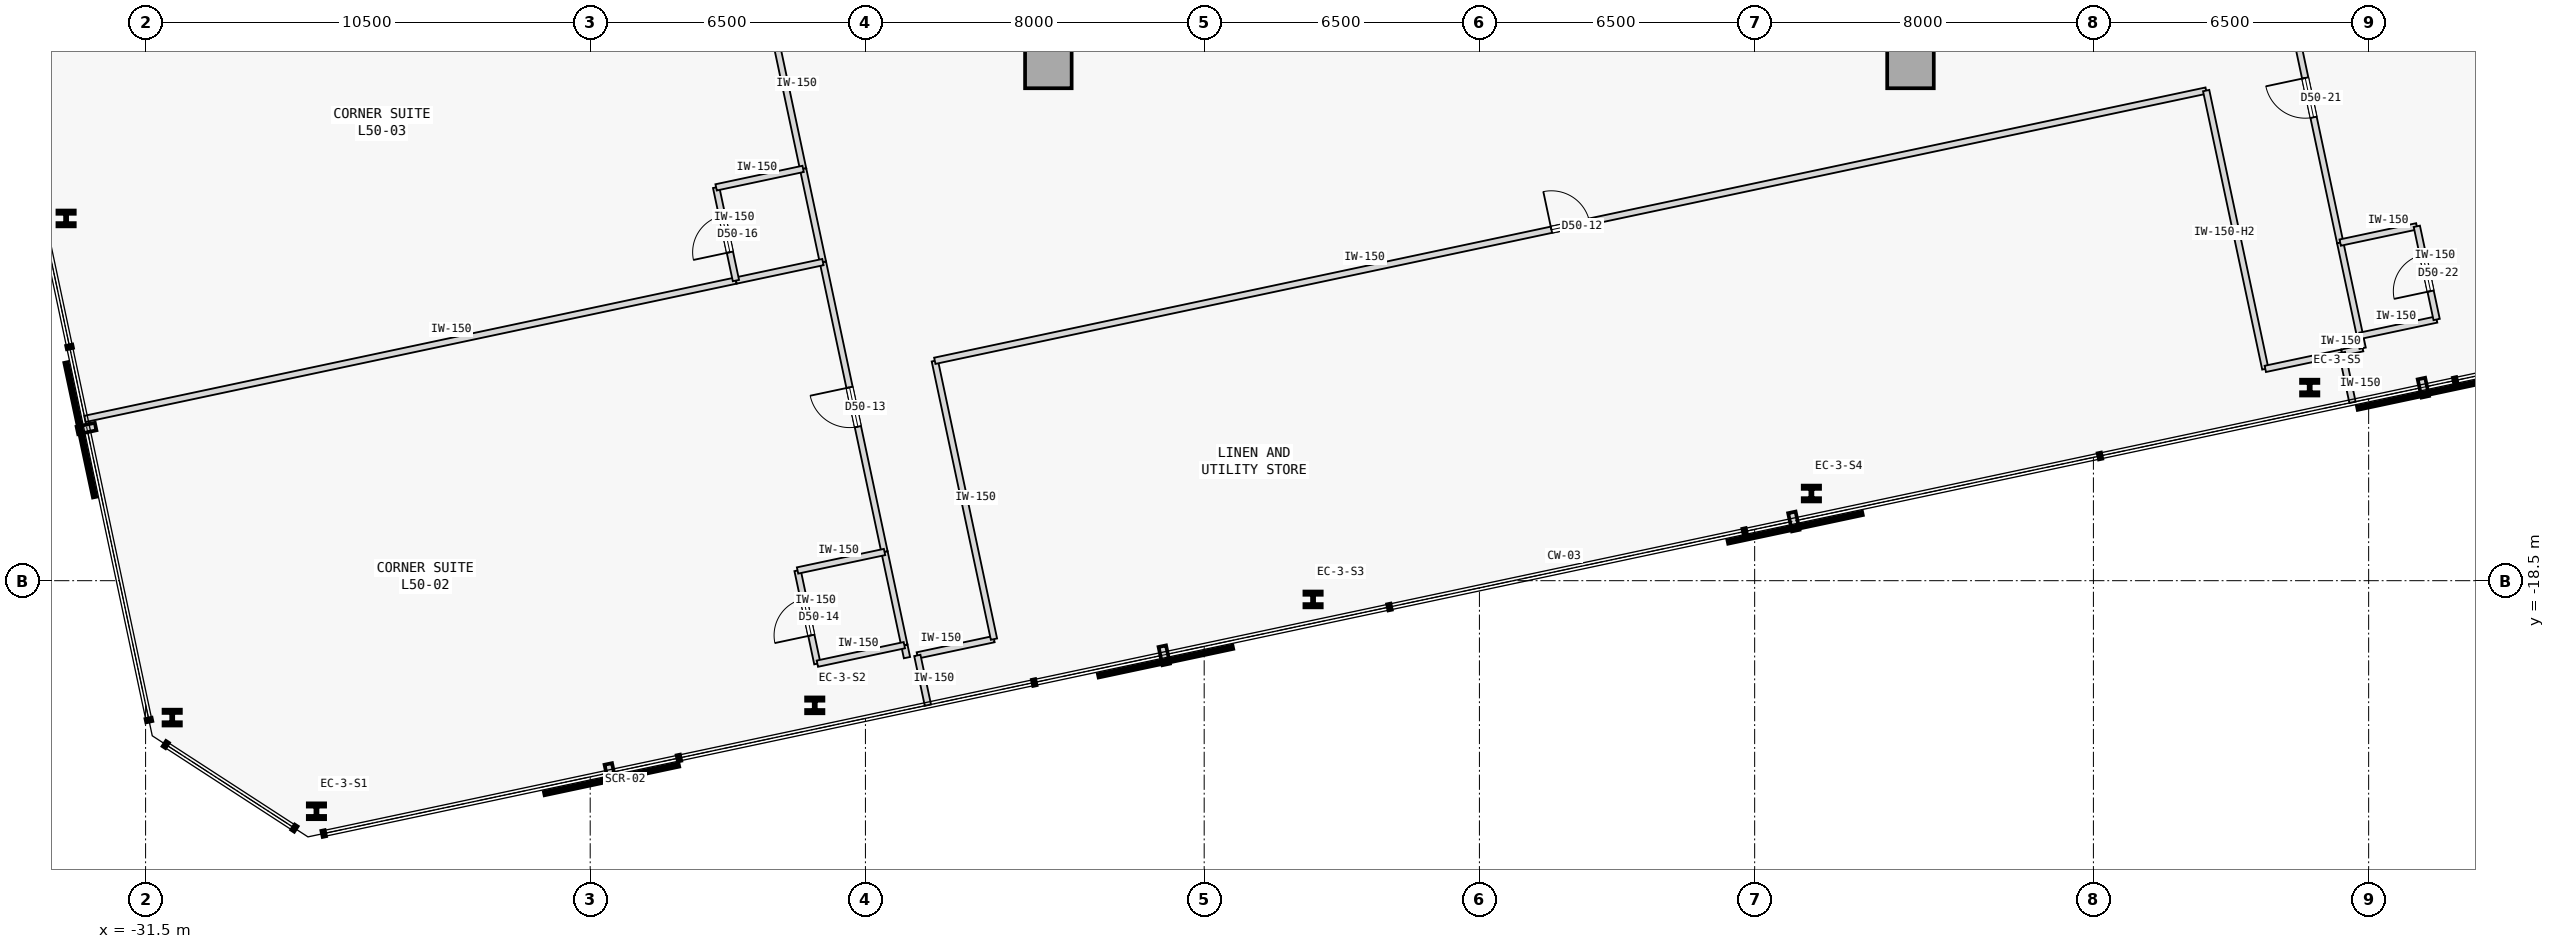
"""IFC4 building model, lengths in metres.
Left out: names, types, materials, properties, quantities, classifications, styles, units other than length and angle.
Written with IfcOpenShell. Run it as: python <this file> out.ifc"""

import sys

from ifc_helpers import new_model, si_unit, direction, frame, frame_2d, origin, origin_2d, place, context, subcontext, project, spatial, rectangle, i_section, extrude, element, fill, save


model = new_model("IFC4")
c1 = context("Model", 3, precision=1e-05, world=origin(), true_north=direction((0.0, 1.0)))
c2 = subcontext(c1, "Body", "Model", "MODEL_VIEW")
j1 = project(units=[si_unit("LENGTHUNIT", "METRE"), si_unit("PLANEANGLEUNIT", "RADIAN")], contexts=[c1])
p1 = place(None, origin())
s1 = spatial("IfcSite", under=j1, at=p1, CompositionType="ELEMENT")
p2 = place(p1, origin())
s2 = spatial("IfcBuilding", under=s1, at=p2, CompositionType="ELEMENT")
p3 = place(p2, frame((0.0, 0.0, 192.2)))
s3 = spatial("IfcBuildingStorey", under=s2, at=p3, CompositionType="ELEMENT", Elevation=192.2)
for number, where, z_axis, x_axis in (
    (1, (-10.18, -6.32, 0.0), (0.0, 0.0, 1.0), (1.0, 0.0, 0.0)),
    (2, (10.18, -6.32, 0.0), (0.0, 0.0, 1.0), (1.0, 0.0, 0.0)),
):
    element("IfcColumn", number, at=place(p3, frame(where, z_axis=z_axis, x_axis=x_axis)), inside=s3, PredefinedType="COLUMN", context=c2, shape_type="SweptSolid", body=[
        extrude(rectangle(XDim=1.1, YDim=1.1, at=origin_2d()), origin(), (0.0, 0.0, 1.0), 3.4),
    ])
for number, where, z_axis, x_axis in (
    (3, (-27.465, -23.946, 0.0), (0.0, 0.0, 1.0), (1.0, 0.0, 0.0)),
    (4, (-15.697, -21.444, 0.0), (0.0, 0.0, 1.0), (1.0, 0.0, 0.0)),
    (5, (-3.928, -18.943, 0.0), (0.0, 0.0, 1.0), (1.0, 0.0, 0.0)),
    (6, (7.84, -16.441, 0.0), (0.0, 0.0, 1.0), (1.0, 0.0, 0.0)),
    (7, (19.608, -13.94, 0.0), (0.0, 0.0, 1.0), (1.0, 0.0, 0.0)),
    (8, (-33.377, -9.945, 0.0), (0.0, 0.0, 1.0), (1.0, 0.0, 0.0)),
    (9, (-30.871, -21.733, 0.0), (0.0, 0.0, 1.0), (1.0, 0.0, 0.0)),
):
    element("IfcColumn", number, at=place(p3, frame(where, z_axis=z_axis, x_axis=x_axis)), inside=s3, PredefinedType="COLUMN", context=c2, shape_type="SweptSolid", body=[
        extrude(i_section(OverallWidth=0.409, OverallDepth=0.374, WebThickness=0.048, FlangeThickness=0.077, FilletRadius=0.015, at=origin_2d()), origin(), (0.0, 0.0, 1.0), 3.4),
    ])
p4 = place(p3, frame((-13.274, -20.265, 0.0), z_axis=(0.0, 0.0, 1.0), x_axis=(0.978160192495, 0.207852442415, 0.0)))
e10 = element("IfcWall", 10, at=p4, inside=s3, PredefinedType="PARTITIONING", context=c2, shape_type="SweptSolid", body=[
    extrude(rectangle(XDim=1.85, YDim=0.15, at=frame_2d((0.925, 0.0))), origin(), (0.0, 0.0, 1.0), 3.175),
])
p5 = place(p3, frame((-11.465, -19.88, 0.0), z_axis=(0.0, 0.0, 1.0), x_axis=(-0.207916109912, 0.978146661416, 0.0)))
e11 = element("IfcWall", 11, at=p5, inside=s3, PredefinedType="PARTITIONING", context=c2, shape_type="SweptSolid", body=[
    extrude(rectangle(XDim=6.72, YDim=0.15, at=frame_2d((3.36, 0.0))), origin(), (0.0, 0.0, 1.0), 3.175),
])
p6 = place(p3, frame((-12.862, -13.307, 0.0), z_axis=(0.0, 0.0, 1.0), x_axis=(0.97814793387, 0.207910123527, 0.0)))
e12 = element("IfcWall", 12, at=p6, inside=s3, PredefinedType="PARTITIONING", context=c2, shape_type="SweptSolid", body=[
    extrude(rectangle(XDim=30.695, YDim=0.15, at=frame_2d((15.348, 0.0))), origin(), (0.0, 0.0, 1.0), 3.175),
])
p7 = place(p6, frame((14.887, 0.0, 0.0)))
e13 = element("IfcOpeningElement", 13, at=p7, cuts=e12, PredefinedType="OPENING", context=c2, shape_type="SweptSolid", body=[
    extrude(rectangle(XDim=0.92, YDim=2.15, at=frame_2d((0.46, 1.075))), frame((0.0, 0.085, 0.0), z_axis=(0.0, -1.0, 0.0), x_axis=(1.0, 0.0, 0.0)), (0.0, 0.0, 1.0), 0.17),
])
p8 = place(p3, frame((18.56, -13.498, 0.0), z_axis=(0.0, 0.0, 1.0), x_axis=(-0.207888737749, 0.978152479278, 0.0)))
e14 = element("IfcWall", 14, at=p8, inside=s3, PredefinedType="PARTITIONING", context=c2, shape_type="SweptSolid", body=[
    extrude(rectangle(XDim=6.72, YDim=0.15, at=frame_2d((3.36, 0.0))), origin(), (0.0, 0.0, 1.0), 2.575),
])
p9 = place(p3, frame((18.56, -13.498, 0.0), z_axis=(0.0, 0.0, 1.0), x_axis=(0.978160192495, 0.207852442415, 0.0)))
e15 = element("IfcWall", 15, at=p9, inside=s3, PredefinedType="PARTITIONING", context=c2, shape_type="SweptSolid", body=[
    extrude(rectangle(XDim=1.85, YDim=0.15, at=frame_2d((0.925, 0.0))), origin(), (0.0, 0.0, 1.0), 3.175),
])
p10 = place(p3, frame((-13.519, -20.317, 0.0), z_axis=(0.0, 0.0, 1.0), x_axis=(-0.207527808066, 0.978229118806, 0.0)))
e16 = element("IfcWall", 16, at=p10, inside=s3, PredefinedType="PARTITIONING", context=c2, shape_type="SweptSolid", body=[
    extrude(rectangle(XDim=0.3, YDim=0.15, at=frame_2d((0.15, 0.0))), origin(), (0.0, 0.0, 1.0), 3.175),
])
p11 = place(p3, frame((-14.049, -17.823, 0.0), z_axis=(0.0, 0.0, 1.0), x_axis=(-0.207940096132, 0.978141562567, 0.0)))
e17 = element("IfcWall", 17, at=p11, inside=s3, PredefinedType="PARTITIONING", context=c2, shape_type="SweptSolid", body=[
    extrude(rectangle(XDim=7.0, YDim=0.15, at=frame_2d((3.5, 0.0))), origin(), (0.0, 0.0, 1.0), 3.175),
])
p12 = place(p11, frame((3.025, 0.0, 0.0)))
e18 = element("IfcOpeningElement", 18, at=p12, cuts=e17, PredefinedType="OPENING", context=c2, shape_type="SweptSolid", body=[
    extrude(rectangle(XDim=0.95, YDim=2.15, at=frame_2d((0.475, 1.075))), frame((0.0, 0.085, 0.0), z_axis=(0.0, -1.0, 0.0), x_axis=(1.0, 0.0, 0.0)), (0.0, 0.0, 1.0), 0.17),
])
p13 = place(p3, frame((-13.581, -20.023, 0.0), z_axis=(0.0, 0.0, 1.0), x_axis=(-0.207891197838, 0.978151956427, 0.0)))
e19 = element("IfcWall", 19, at=p13, inside=s3, PredefinedType="PARTITIONING", context=c2, shape_type="SweptSolid", body=[
    extrude(rectangle(XDim=2.25, YDim=0.15, at=frame_2d((1.125, 0.0))), origin(), (0.0, 0.0, 1.0), 3.175),
])
p14 = place(p3, frame((-15.972, -8.775, 0.0), z_axis=(0.0, 0.0, 1.0), x_axis=(-0.207894825434, 0.97815118543, 0.0)))
e20 = element("IfcWall", 20, at=p14, inside=s3, PredefinedType="PARTITIONING", context=c2, shape_type="SweptSolid", body=[
    extrude(rectangle(XDim=8.5, YDim=0.15, at=frame_2d((4.25, 0.0))), origin(), (0.0, 0.0, 1.0), 3.175),
])
p15 = place(p14, frame((5.05, 0.0, 0.0)))
e21 = element("IfcOpeningElement", 21, at=p15, cuts=e20, PredefinedType="OPENING", context=c2, shape_type="SweptSolid", body=[
    extrude(rectangle(XDim=0.95, YDim=2.15, at=frame_2d((0.475, 1.075))), frame((0.0, 0.085, 0.0), z_axis=(0.0, -1.0, 0.0), x_axis=(1.0, 0.0, 0.0)), (0.0, 0.0, 1.0), 0.17),
])
p16 = place(p3, frame((-15.504, -10.976, 0.0), z_axis=(0.0, 0.0, 1.0), x_axis=(-0.207891197838, 0.978151956427, 0.0)))
e22 = element("IfcWall", 22, at=p16, inside=s3, PredefinedType="PARTITIONING", context=c2, shape_type="SweptSolid", body=[
    extrude(rectangle(XDim=2.25, YDim=0.15, at=frame_2d((1.125, 0.0))), origin(), (0.0, 0.0, 1.0), 3.175),
])
p17 = place(p3, frame((20.369, -13.114, 0.0), z_axis=(0.0, 0.0, 1.0), x_axis=(0.978143962546, 0.207928806409, 0.0)))
e23 = element("IfcWall", 23, at=p17, inside=s3, PredefinedType="PARTITIONING", context=c2, shape_type="SweptSolid", body=[
    extrude(rectangle(XDim=0.5, YDim=0.15, at=frame_2d((0.25, 0.0))), origin(), (0.0, 0.0, 1.0), 3.175),
])
p18 = place(p3, frame((20.858, -13.01, 0.0), z_axis=(0.0, 0.0, 1.0), x_axis=(-0.208306395052, 0.978063620518, 0.0)))
e24 = element("IfcWall", 24, at=p18, inside=s3, PredefinedType="PARTITIONING", context=c2, shape_type="SweptSolid", body=[
    extrude(rectangle(XDim=0.3, YDim=0.15, at=frame_2d((0.15, 0.0))), origin(), (0.0, 0.0, 1.0), 3.175),
])
p19 = place(p3, frame((20.328, -10.515, 0.0), z_axis=(0.0, 0.0, 1.0), x_axis=(-0.207906726269, 0.978148655968, 0.0)))
e25 = element("IfcWall", 25, at=p19, inside=s3, PredefinedType="PARTITIONING", context=c2, shape_type="SweptSolid", body=[
    extrude(rectangle(XDim=7.0, YDim=0.15, at=frame_2d((3.5, 0.0))), origin(), (0.0, 0.0, 1.0), 3.175),
])
p20 = place(p19, frame((3.025, 0.0, 0.0)))
e26 = element("IfcOpeningElement", 26, at=p20, cuts=e25, PredefinedType="OPENING", context=c2, shape_type="SweptSolid", body=[
    extrude(rectangle(XDim=0.95, YDim=2.15, at=frame_2d((0.475, 1.075))), frame((0.0, 0.085, 0.0), z_axis=(0.0, -1.0, 0.0), x_axis=(1.0, 0.0, 0.0)), (0.0, 0.0, 1.0), 0.17),
])
p21 = place(p3, frame((20.796, -12.716, 0.0), z_axis=(0.0, 0.0, 1.0), x_axis=(-0.207891197838, 0.978151956427, 0.0)))
e27 = element("IfcWall", 27, at=p21, inside=s3, PredefinedType="PARTITIONING", context=c2, shape_type="SweptSolid", body=[
    extrude(rectangle(XDim=2.25, YDim=0.15, at=frame_2d((1.125, 0.0))), origin(), (0.0, 0.0, 1.0), 3.175),
])
for number, where, z_axis, x_axis in (
    (28, (-13.025, -21.439, 0.0), (0.0, 0.0, 1.0), (-0.208, 0.978, 0.0)),
    (29, (20.619, -14.288, 0.0), (0.0, 0.0, 1.0), (-0.208, 0.978, 0.0)),
):
    element("IfcWall", number, at=place(p3, frame(where, z_axis=z_axis, x_axis=x_axis)), inside=s3, PredefinedType="PARTITIONING", context=c2, shape_type="SweptSolid", body=[
        extrude(rectangle(XDim=1.2, YDim=0.15, at=frame_2d((0.6, 0.0))), origin(), (0.0, 0.0, 1.0), 3.175),
    ])
p22 = place(p3, frame((-15.635, -20.46, 0.0), z_axis=(0.0, 0.0, 1.0), x_axis=(-0.207913264065, 0.978147266328, 0.0)))
e30 = element("IfcWall", 30, at=p22, inside=s3, PredefinedType="PARTITIONING", context=c2, shape_type="SweptSolid", body=[
    extrude(rectangle(XDim=2.25, YDim=0.15, at=frame_2d((1.125, 0.0))), origin(), (0.0, 0.0, 1.0), 3.175),
])
p23 = place(p22, frame((0.685, 0.0, 0.0)))
e31 = element("IfcOpeningElement", 31, at=p23, cuts=e30, PredefinedType="OPENING", context=c2, shape_type="SweptSolid", body=[
    extrude(rectangle(XDim=0.88, YDim=2.15, at=frame_2d((0.44, 1.075))), frame((0.0, 0.085, 0.0), z_axis=(0.0, -1.0, 0.0), x_axis=(1.0, 0.0, 0.0)), (0.0, 0.0, 1.0), 0.17),
])
for number, where, z_axis, x_axis in (
    (32, (-15.635, -20.46, 0.0), (0.0, 0.0, 1.0), (0.978, 0.208, 0.0)),
    (33, (-16.103, -18.259, 0.0), (0.0, 0.0, 1.0), (0.978, 0.208, 0.0)),
):
    element("IfcWall", number, at=place(p3, frame(where, z_axis=z_axis, x_axis=x_axis)), inside=s3, PredefinedType="PARTITIONING", context=c2, shape_type="SweptSolid", body=[
        extrude(rectangle(XDim=2.1, YDim=0.15, at=frame_2d((1.05, 0.0))), origin(), (0.0, 0.0, 1.0), 3.175),
    ])
p24 = place(p3, frame((-32.933, -14.68, 0.0), z_axis=(0.0, 0.0, 1.0), x_axis=(0.978146137903, 0.207918572776, 0.0)))
e34 = element("IfcWall", 34, at=p24, inside=s3, PredefinedType="PARTITIONING", context=c2, shape_type="SweptSolid", body=[
    extrude(rectangle(XDim=15.718, YDim=0.15, at=frame_2d((7.859, 0.0))), origin(), (0.0, 0.0, 1.0), 3.175),
])
p25 = place(p3, frame((-17.558, -11.412, 0.0), z_axis=(0.0, 0.0, 1.0), x_axis=(0.978153236239, 0.207885176084, 0.0)))
e35 = element("IfcWall", 35, at=p25, inside=s3, PredefinedType="PARTITIONING", context=c2, shape_type="SweptSolid", body=[
    extrude(rectangle(XDim=2.1, YDim=0.15, at=frame_2d((1.05, 0.0))), origin(), (0.0, 0.0, 1.0), 3.175),
])
p26 = place(p3, frame((-17.558, -11.412, 0.0), z_axis=(0.0, 0.0, 1.0), x_axis=(-0.207891197838, 0.978151956427, 0.0)))
e36 = element("IfcWall", 36, at=p26, inside=s3, PredefinedType="PARTITIONING", context=c2, shape_type="SweptSolid", body=[
    extrude(rectangle(XDim=2.25, YDim=0.15, at=frame_2d((1.125, 0.0))), origin(), (0.0, 0.0, 1.0), 3.175),
])
p27 = place(p26, frame((0.685, 0.0, 0.0)))
e37 = element("IfcOpeningElement", 37, at=p27, cuts=e36, PredefinedType="OPENING", context=c2, shape_type="SweptSolid", body=[
    extrude(rectangle(XDim=0.88, YDim=2.15, at=frame_2d((0.44, 1.075))), frame((0.0, 0.085, 0.0), z_axis=(0.0, -1.0, 0.0), x_axis=(1.0, 0.0, 0.0)), (0.0, 0.0, 1.0), 0.17),
])
p28 = place(p3, frame((-18.026, -9.211, 0.0), z_axis=(0.0, 0.0, 1.0), x_axis=(0.978153236239, 0.207885176084, 0.0)))
e38 = element("IfcWall", 38, at=p28, inside=s3, PredefinedType="PARTITIONING", context=c2, shape_type="SweptSolid", body=[
    extrude(rectangle(XDim=2.1, YDim=0.15, at=frame_2d((1.05, 0.0))), origin(), (0.0, 0.0, 1.0), 3.175),
])
for number, where, z_axis, x_axis in (
    (39, (20.796, -12.716, 0.0), (0.0, 0.0, 1.0), (0.978, 0.208, 0.0)),
    (40, (20.328, -10.515, 0.0), (0.0, 0.0, 1.0), (0.978, 0.208, 0.0)),
):
    element("IfcWall", number, at=place(p3, frame(where, z_axis=z_axis, x_axis=x_axis)), inside=s3, PredefinedType="PARTITIONING", context=c2, shape_type="SweptSolid", body=[
        extrude(rectangle(XDim=1.85, YDim=0.15, at=frame_2d((0.925, 0.0))), origin(), (0.0, 0.0, 1.0), 3.175),
    ])
p29 = place(p3, frame((22.605, -12.332, 0.0), z_axis=(0.0, 0.0, 1.0), x_axis=(-0.207891197838, 0.978151956427, 0.0)))
e41 = element("IfcWall", 41, at=p29, inside=s3, PredefinedType="PARTITIONING", context=c2, shape_type="SweptSolid", body=[
    extrude(rectangle(XDim=2.25, YDim=0.15, at=frame_2d((1.125, 0.0))), origin(), (0.0, 0.0, 1.0), 3.175),
])
p30 = place(p29, frame((0.685, 0.0, 0.0)))
e42 = element("IfcOpeningElement", 42, at=p30, cuts=e41, PredefinedType="OPENING", context=c2, shape_type="SweptSolid", body=[
    extrude(rectangle(XDim=0.88, YDim=2.15, at=frame_2d((0.44, 1.075))), frame((0.0, 0.085, 0.0), z_axis=(0.0, -1.0, 0.0), x_axis=(1.0, 0.0, 0.0)), (0.0, 0.0, 1.0), 0.17),
])
p31 = place(p7, origin())
e43 = element("IfcDoor", 43, at=p31, inside=s3, OperationType="SINGLE_SWING_LEFT", PredefinedType="DOOR", context=c2, shape_type="SweptSolid", body=[
    extrude(rectangle(XDim=0.92, YDim=2.15, at=frame_2d((0.46, 1.075))), frame((0.0, 0.025, 0.0), z_axis=(0.0, -1.0, 0.0), x_axis=(1.0, 0.0, 0.0)), (0.0, 0.0, 1.0), 0.05),
])
fill(e13, e43)
p32 = place(p12, origin())
e44 = element("IfcDoor", 44, at=p32, inside=s3, OperationType="SINGLE_SWING_RIGHT", PredefinedType="DOOR", context=c2, shape_type="SweptSolid", body=[
    extrude(rectangle(XDim=0.95, YDim=2.15, at=frame_2d((0.475, 1.075))), frame((0.0, 0.025, 0.0), z_axis=(0.0, -1.0, 0.0), x_axis=(1.0, 0.0, 0.0)), (0.0, 0.0, 1.0), 0.05),
])
fill(e18, e44)
p33 = place(p23, origin())
e45 = element("IfcDoor", 45, at=p33, inside=s3, OperationType="SINGLE_SWING_LEFT", PredefinedType="DOOR", context=c2, shape_type="SweptSolid", body=[
    extrude(rectangle(XDim=0.88, YDim=2.15, at=frame_2d((0.44, 1.075))), frame((0.0, 0.025, 0.0), z_axis=(0.0, -1.0, 0.0), x_axis=(1.0, 0.0, 0.0)), (0.0, 0.0, 1.0), 0.05),
])
fill(e31, e45)
p34 = place(p27, origin())
e46 = element("IfcDoor", 46, at=p34, inside=s3, OperationType="SINGLE_SWING_LEFT", PredefinedType="DOOR", context=c2, shape_type="SweptSolid", body=[
    extrude(rectangle(XDim=0.88, YDim=2.15, at=frame_2d((0.44, 1.075))), frame((0.0, 0.025, 0.0), z_axis=(0.0, -1.0, 0.0), x_axis=(1.0, 0.0, 0.0)), (0.0, 0.0, 1.0), 0.05),
])
fill(e37, e46)
p35 = place(p20, origin())
e47 = element("IfcDoor", 47, at=p35, inside=s3, OperationType="SINGLE_SWING_RIGHT", PredefinedType="DOOR", context=c2, shape_type="SweptSolid", body=[
    extrude(rectangle(XDim=0.95, YDim=2.15, at=frame_2d((0.475, 1.075))), frame((0.0, 0.025, 0.0), z_axis=(0.0, -1.0, 0.0), x_axis=(1.0, 0.0, 0.0)), (0.0, 0.0, 1.0), 0.05),
])
fill(e26, e47)
p36 = place(p30, origin())
e48 = element("IfcDoor", 48, at=p36, inside=s3, OperationType="SINGLE_SWING_LEFT", PredefinedType="DOOR", context=c2, shape_type="SweptSolid", body=[
    extrude(rectangle(XDim=0.88, YDim=2.15, at=frame_2d((0.44, 1.075))), frame((0.0, 0.025, 0.0), z_axis=(0.0, -1.0, 0.0), x_axis=(1.0, 0.0, 0.0)), (0.0, 0.0, 1.0), 0.05),
])
fill(e42, e48)
save(model, sys.argv[1])
